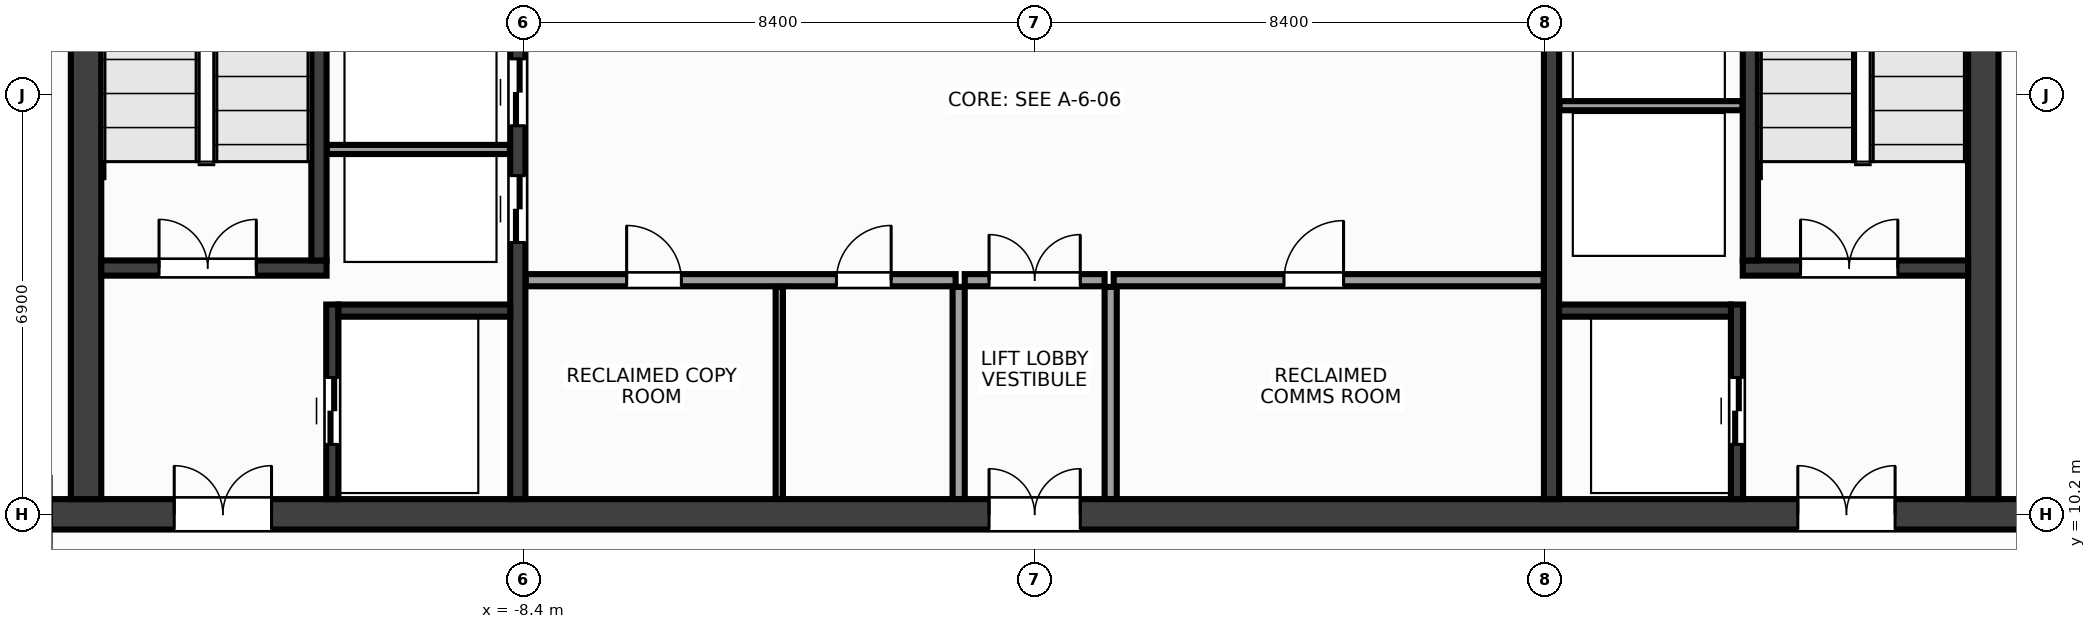
"""IFC4 building model, lengths in metres.
Left out: names, types, materials, properties, quantities, classifications, styles, units other than length and angle.
Written with IfcOpenShell. Run it as: python <this file> out.ifc"""

import sys

from ifc_helpers import new_model, si_unit, direction, frame, frame_2d, origin, place, context, subcontext, project, spatial, rectangle, extrude, source, transform, mapped, element, fill, save


model = new_model("IFC4")
c1 = context("Model", 3, precision=1e-05, world=origin(), true_north=direction((0.0, 1.0)))
c2 = subcontext(c1, "Body", "Model", "MODEL_VIEW")
j1 = project(units=[si_unit("LENGTHUNIT", "METRE"), si_unit("PLANEANGLEUNIT", "RADIAN")], contexts=[c1])
p1 = place(None, origin())
s1 = spatial("IfcSite", under=j1, at=p1, CompositionType="ELEMENT")
p2 = place(p1, origin())
s2 = spatial("IfcBuilding", under=s1, at=p2, CompositionType="ELEMENT")
p3 = place(p2, frame((0.0, 0.0, 272.0)))
s3 = spatial("IfcBuildingStorey", under=s2, at=p3, CompositionType="ELEMENT", Elevation=272.0)
m1 = source(origin(), c2, "Body", "SweptSolid", [
    extrude(rectangle(XDim=32.4, YDim=0.5, at=frame_2d((16.2, 0.0))), origin(), (0.0, 0.0, 1.0), 3.6),
])
p4 = place(p3, frame((-16.2, 10.2, 0.0), z_axis=(0.0, 0.0, 1.0), x_axis=(1.0, 0.0, 0.0)))
e1 = element("IfcWall", 1, at=p4, inside=s3, PredefinedType="SHEAR", context=c2, shape_type="MappedRepresentation", body=[
    mapped(m1, transform((0.0, 0.0, 0.0), x_axis=(1.0, 0.0, 0.0), y_axis=(0.0, 1.0, 0.0), z_axis=(0.0, 0.0, 1.0), scale=1.0)),
])
p5 = place(p4, frame((2.05, 0.0, 0.0)))
e2 = element("IfcOpeningElement", 2, at=p5, cuts=e1, PredefinedType="OPENING", context=c2, shape_type="SweptSolid", body=[
    extrude(rectangle(XDim=1.6, YDim=2.15, at=frame_2d((0.8, 1.075))), frame((0.0, 0.262, 0.0), z_axis=(0.0, -1.0, 0.0), x_axis=(1.0, 0.0, 0.0)), (0.0, 0.0, 1.0), 0.524),
])
p6 = place(p4, frame((28.75, 0.0, 0.0)))
e3 = element("IfcOpeningElement", 3, at=p6, cuts=e1, PredefinedType="OPENING", context=c2, shape_type="SweptSolid", body=[
    extrude(rectangle(XDim=1.6, YDim=2.15, at=frame_2d((0.8, 1.075))), frame((0.0, 0.262, 0.0), z_axis=(0.0, -1.0, 0.0), x_axis=(1.0, 0.0, 0.0)), (0.0, 0.0, 1.0), 0.524),
])
p7 = place(p4, frame((15.45, 0.0, 0.0)))
e4 = element("IfcOpeningElement", 4, at=p7, cuts=e1, PredefinedType="OPENING", context=c2, shape_type="SweptSolid", body=[
    extrude(rectangle(XDim=1.5, YDim=2.2, at=frame_2d((0.75, 1.1))), frame((0.0, 0.262, 0.0), z_axis=(0.0, -1.0, 0.0), x_axis=(1.0, 0.0, 0.0)), (0.0, 0.0, 1.0), 0.524),
])
m2 = source(origin(), c2, "Body", "SweptSolid", [
    extrude(rectangle(XDim=13.1, YDim=0.5, at=frame_2d((6.55, 0.0))), origin(), (0.0, 0.0, 1.0), 3.6),
])
for number, where, z_axis, x_axis in (
    (5, (-15.6, 10.45, 0.0), (0.0, 0.0, 1.0), (0.0, 1.0, 0.0)),
    (6, (15.6, 10.45, 0.0), (0.0, 0.0, 1.0), (0.0, 1.0, 0.0)),
):
    element("IfcWall", number, at=place(p3, frame(where, z_axis=z_axis, x_axis=x_axis)), inside=s3, PredefinedType="SHEAR", context=c2, shape_type="MappedRepresentation", body=[
        mapped(m2, transform((0.0, 0.0, 0.0), x_axis=(1.0, 0.0, 0.0), y_axis=(0.0, 1.0, 0.0), z_axis=(0.0, 0.0, 1.0), scale=1.0)),
    ])
m3 = source(origin(), c2, "Body", "SweptSolid", [
    extrude(rectangle(XDim=13.1, YDim=0.25, at=frame_2d((6.55, 0.0))), origin(), (0.0, 0.0, 1.0), 3.6),
])
p8 = place(p3, frame((-8.5, 10.45, 0.0), z_axis=(0.0, 0.0, 1.0), x_axis=(0.0, 1.0, 0.0)))
e7 = element("IfcWall", 7, at=p8, inside=s3, PredefinedType="SHEAR", context=c2, shape_type="MappedRepresentation", body=[
    mapped(m3, transform((0.0, 0.0, 0.0), x_axis=(1.0, 0.0, 0.0), y_axis=(0.0, 1.0, 0.0), z_axis=(0.0, 0.0, 1.0), scale=1.0)),
])
p9 = place(p8, frame((4.22, 0.0, 0.0)))
e8 = element("IfcOpeningElement", 8, at=p9, cuts=e7, PredefinedType="OPENING", context=c2, shape_type="SweptSolid", body=[
    extrude(rectangle(XDim=1.1, YDim=2.15, at=frame_2d((0.55, 1.075))), frame((0.0, 0.137, 0.0), z_axis=(0.0, -1.0, 0.0), x_axis=(1.0, 0.0, 0.0)), (0.0, 0.0, 1.0), 0.274),
])
p10 = place(p8, frame((6.14, 0.0, 0.0)))
e9 = element("IfcOpeningElement", 9, at=p10, cuts=e7, PredefinedType="OPENING", context=c2, shape_type="SweptSolid", body=[
    extrude(rectangle(XDim=1.1, YDim=2.15, at=frame_2d((0.55, 1.075))), frame((0.0, 0.137, 0.0), z_axis=(0.0, -1.0, 0.0), x_axis=(1.0, 0.0, 0.0)), (0.0, 0.0, 1.0), 0.274),
])
p11 = place(p8, frame((8.06, 0.0, 0.0)))
e10 = element("IfcOpeningElement", 10, at=p11, cuts=e7, PredefinedType="OPENING", context=c2, shape_type="SweptSolid", body=[
    extrude(rectangle(XDim=1.1, YDim=2.15, at=frame_2d((0.55, 1.075))), frame((0.0, 0.137, 0.0), z_axis=(0.0, -1.0, 0.0), x_axis=(1.0, 0.0, 0.0)), (0.0, 0.0, 1.0), 0.274),
])
p12 = place(p3, frame((8.5, 10.45, 0.0), z_axis=(0.0, 0.0, 1.0), x_axis=(0.0, 1.0, 0.0)))
e11 = element("IfcWall", 11, at=p12, inside=s3, PredefinedType="SHEAR", context=c2, shape_type="MappedRepresentation", body=[
    mapped(m3, transform((0.0, 0.0, 0.0), x_axis=(1.0, 0.0, 0.0), y_axis=(0.0, 1.0, 0.0), z_axis=(0.0, 0.0, 1.0), scale=1.0)),
])
p13 = place(p12, frame((10.0, 0.0, 0.0)))
e12 = element("IfcOpeningElement", 12, at=p13, cuts=e11, PredefinedType="OPENING", context=c2, shape_type="SweptSolid", body=[
    extrude(rectangle(XDim=0.95, YDim=2.15, at=frame_2d((0.475, 1.075))), frame((0.0, 0.137, 0.0), z_axis=(0.0, -1.0, 0.0), x_axis=(1.0, 0.0, 0.0)), (0.0, 0.0, 1.0), 0.274),
])
m4 = source(origin(), c2, "Body", "SweptSolid", [
    extrude(rectangle(XDim=3.705, YDim=0.25, at=frame_2d((1.853, 0.0))), origin(), (0.0, 0.0, 1.0), 3.6),
])
p14 = place(p3, frame((-15.35, 14.25, 0.0), z_axis=(0.0, 0.0, 1.0), x_axis=(1.0, 0.0, 0.0)))
e13 = element("IfcWall", 13, at=p14, inside=s3, PredefinedType="SHEAR", context=c2, shape_type="MappedRepresentation", body=[
    mapped(m4, transform((0.0, 0.0, 0.0), x_axis=(1.0, 0.0, 0.0), y_axis=(0.0, 1.0, 0.0), z_axis=(0.0, 0.0, 1.0), scale=1.0)),
])
p15 = place(p14, frame((0.95, 0.0, 0.0)))
e14 = element("IfcOpeningElement", 14, at=p15, cuts=e13, PredefinedType="OPENING", context=c2, shape_type="SweptSolid", body=[
    extrude(rectangle(XDim=1.6, YDim=2.15, at=frame_2d((0.8, 1.075))), frame((0.0, 0.137, 0.0), z_axis=(0.0, -1.0, 0.0), x_axis=(1.0, 0.0, 0.0)), (0.0, 0.0, 1.0), 0.274),
])
m5 = source(origin(), c2, "Body", "SweptSolid", [
    extrude(rectangle(XDim=9.175, YDim=0.25, at=frame_2d((4.587, 0.0))), origin(), (0.0, 0.0, 1.0), 3.6),
])
p16 = place(p3, frame((-11.77, 14.375, 0.0), z_axis=(0.0, 0.0, 1.0), x_axis=(0.0, 1.0, 0.0)))
e15 = element("IfcWall", 15, at=p16, inside=s3, PredefinedType="SHEAR", context=c2, shape_type="MappedRepresentation", body=[
    mapped(m5, transform((0.0, 0.0, 0.0), x_axis=(1.0, 0.0, 0.0), y_axis=(0.0, 1.0, 0.0), z_axis=(0.0, 0.0, 1.0), scale=1.0)),
])
p17 = place(p3, frame((11.645, 14.25, 0.0), z_axis=(0.0, 0.0, 1.0), x_axis=(1.0, 0.0, 0.0)))
e16 = element("IfcWall", 16, at=p17, inside=s3, PredefinedType="SHEAR", context=c2, shape_type="MappedRepresentation", body=[
    mapped(m4, transform((0.0, 0.0, 0.0), x_axis=(1.0, 0.0, 0.0), y_axis=(0.0, 1.0, 0.0), z_axis=(0.0, 0.0, 1.0), scale=1.0)),
])
p18 = place(p17, frame((0.95, 0.0, 0.0)))
e17 = element("IfcOpeningElement", 17, at=p18, cuts=e16, PredefinedType="OPENING", context=c2, shape_type="SweptSolid", body=[
    extrude(rectangle(XDim=1.6, YDim=2.15, at=frame_2d((0.8, 1.075))), frame((0.0, 0.137, 0.0), z_axis=(0.0, -1.0, 0.0), x_axis=(1.0, 0.0, 0.0)), (0.0, 0.0, 1.0), 0.274),
])
p19 = place(p3, frame((11.77, 14.375, 0.0), z_axis=(0.0, 0.0, 1.0), x_axis=(0.0, 1.0, 0.0)))
e18 = element("IfcWall", 18, at=p19, inside=s3, PredefinedType="SHEAR", context=c2, shape_type="MappedRepresentation", body=[
    mapped(m5, transform((0.0, 0.0, 0.0), x_axis=(1.0, 0.0, 0.0), y_axis=(0.0, 1.0, 0.0), z_axis=(0.0, 0.0, 1.0), scale=1.0)),
])
m6 = source(origin(), c2, "Body", "SweptSolid", [
    extrude(rectangle(XDim=3.2, YDim=0.2, at=frame_2d((1.6, 0.0))), origin(), (0.0, 0.0, 1.0), 3.6),
])
p20 = place(p3, frame((-11.55, 10.45, 0.0), z_axis=(0.0, 0.0, 1.0), x_axis=(0.0, 1.0, 0.0)))
e19 = element("IfcWall", 19, at=p20, inside=s3, PredefinedType="SHEAR", context=c2, shape_type="MappedRepresentation", body=[
    mapped(m6, transform((0.0, 0.0, 0.0), x_axis=(1.0, 0.0, 0.0), y_axis=(0.0, 1.0, 0.0), z_axis=(0.0, 0.0, 1.0), scale=1.0)),
])
p21 = place(p20, frame((0.9, 0.0, 0.0)))
e20 = element("IfcOpeningElement", 20, at=p21, cuts=e19, PredefinedType="OPENING", context=c2, shape_type="SweptSolid", body=[
    extrude(rectangle(XDim=1.1, YDim=2.15, at=frame_2d((0.55, 1.075))), frame((0.0, 0.112, 0.0), z_axis=(0.0, -1.0, 0.0), x_axis=(1.0, 0.0, 0.0)), (0.0, 0.0, 1.0), 0.224),
])
m7 = source(origin(), c2, "Body", "SweptSolid", [
    extrude(rectangle(XDim=2.825, YDim=0.2, at=frame_2d((1.413, 0.0))), origin(), (0.0, 0.0, 1.0), 3.6),
])
p22 = place(p3, frame((-11.45, 13.55, 0.0), z_axis=(0.0, 0.0, 1.0), x_axis=(1.0, 0.0, 0.0)))
e21 = element("IfcWall", 21, at=p22, inside=s3, PredefinedType="SHEAR", context=c2, shape_type="MappedRepresentation", body=[
    mapped(m7, transform((0.0, 0.0, 0.0), x_axis=(1.0, 0.0, 0.0), y_axis=(0.0, 1.0, 0.0), z_axis=(0.0, 0.0, 1.0), scale=1.0)),
])
p23 = place(p3, frame((11.55, 10.45, 0.0), z_axis=(0.0, 0.0, 1.0), x_axis=(0.0, 1.0, 0.0)))
e22 = element("IfcWall", 22, at=p23, inside=s3, PredefinedType="SHEAR", context=c2, shape_type="MappedRepresentation", body=[
    mapped(m6, transform((0.0, 0.0, 0.0), x_axis=(1.0, 0.0, 0.0), y_axis=(0.0, 1.0, 0.0), z_axis=(0.0, 0.0, 1.0), scale=1.0)),
])
p24 = place(p23, frame((0.9, 0.0, 0.0)))
e23 = element("IfcOpeningElement", 23, at=p24, cuts=e22, PredefinedType="OPENING", context=c2, shape_type="SweptSolid", body=[
    extrude(rectangle(XDim=1.1, YDim=2.15, at=frame_2d((0.55, 1.075))), frame((0.0, 0.112, 0.0), z_axis=(0.0, -1.0, 0.0), x_axis=(1.0, 0.0, 0.0)), (0.0, 0.0, 1.0), 0.224),
])
p25 = place(p3, frame((8.625, 13.55, 0.0), z_axis=(0.0, 0.0, 1.0), x_axis=(1.0, 0.0, 0.0)))
e24 = element("IfcWall", 24, at=p25, inside=s3, PredefinedType="SHEAR", context=c2, shape_type="MappedRepresentation", body=[
    mapped(m7, transform((0.0, 0.0, 0.0), x_axis=(1.0, 0.0, 0.0), y_axis=(0.0, 1.0, 0.0), z_axis=(0.0, 0.0, 1.0), scale=1.0)),
])
m8 = source(origin(), c2, "Body", "SweptSolid", [
    extrude(rectangle(XDim=3.01, YDim=0.15, at=frame_2d((1.505, 0.0))), origin(), (0.0, 0.0, 1.0), 3.37),
])
for number, where, z_axis, x_axis in (
    (25, (-11.64, 16.2, 0.0), (0.0, 0.0, 1.0), (1.0, 0.0, 0.0)),
    (26, (8.63, 16.92, 0.0), (0.0, 0.0, 1.0), (1.0, 0.0, 0.0)),
):
    element("IfcWall", number, at=place(p3, frame(where, z_axis=z_axis, x_axis=x_axis)), inside=s3, PredefinedType="PARTITIONING", context=c2, shape_type="MappedRepresentation", body=[
        mapped(m8, transform((0.0, 0.0, 0.0), x_axis=(1.0, 0.0, 0.0), y_axis=(0.0, 1.0, 0.0), z_axis=(0.0, 0.0, 1.0), scale=1.0)),
    ])
m9 = source(origin(), c2, "Body", "SweptSolid", [
    extrude(rectangle(XDim=7.07, YDim=0.2, at=frame_2d((3.535, 0.0))), origin(), (0.0, 0.0, 1.0), 3.37),
])
p26 = place(p3, frame((-8.37, 14.05, 0.0), z_axis=(0.0, 0.0, 1.0), x_axis=(1.0, 0.0, 0.0)))
e27 = element("IfcWall", 27, at=p26, inside=s3, PredefinedType="PARTITIONING", context=c2, shape_type="MappedRepresentation", body=[
    mapped(m9, transform((0.0, 0.0, 0.0), x_axis=(1.0, 0.0, 0.0), y_axis=(0.0, 1.0, 0.0), z_axis=(0.0, 0.0, 1.0), scale=1.0)),
])
p27 = place(p26, frame((1.66, 0.0, 0.0)))
e28 = element("IfcOpeningElement", 28, at=p27, cuts=e27, PredefinedType="OPENING", context=c2, shape_type="SweptSolid", body=[
    extrude(rectangle(XDim=0.9, YDim=2.15, at=frame_2d((0.45, 1.075))), frame((0.0, 0.112, 0.0), z_axis=(0.0, -1.0, 0.0), x_axis=(1.0, 0.0, 0.0)), (0.0, 0.0, 1.0), 0.224),
])
p28 = place(p26, frame((5.11, 0.0, 0.0)))
e29 = element("IfcOpeningElement", 29, at=p28, cuts=e27, PredefinedType="OPENING", context=c2, shape_type="SweptSolid", body=[
    extrude(rectangle(XDim=0.9, YDim=2.15, at=frame_2d((0.45, 1.075))), frame((0.0, 0.112, 0.0), z_axis=(0.0, -1.0, 0.0), x_axis=(1.0, 0.0, 0.0)), (0.0, 0.0, 1.0), 0.224),
])
p29 = place(p3, frame((1.3, 14.05, 0.0), z_axis=(0.0, 0.0, 1.0), x_axis=(1.0, 0.0, 0.0)))
e30 = element("IfcWall", 30, at=p29, inside=s3, PredefinedType="PARTITIONING", context=c2, shape_type="MappedRepresentation", body=[
    mapped(m9, transform((0.0, 0.0, 0.0), x_axis=(1.0, 0.0, 0.0), y_axis=(0.0, 1.0, 0.0), z_axis=(0.0, 0.0, 1.0), scale=1.0)),
])
p30 = place(p29, frame((2.8, 0.0, 0.0)))
e31 = element("IfcOpeningElement", 31, at=p30, cuts=e30, PredefinedType="OPENING", context=c2, shape_type="SweptSolid", body=[
    extrude(rectangle(XDim=0.98, YDim=2.15, at=frame_2d((0.49, 1.075))), frame((0.0, 0.112, 0.0), z_axis=(0.0, -1.0, 0.0), x_axis=(1.0, 0.0, 0.0)), (0.0, 0.0, 1.0), 0.224),
])
m10 = source(origin(), c2, "Body", "SweptSolid", [
    extrude(rectangle(XDim=3.49, YDim=0.2, at=frame_2d((1.745, 0.0))), origin(), (0.0, 0.0, 1.0), 3.37),
])
for number, where, z_axis, x_axis in (
    (32, (-1.25, 10.45, 0.0), (0.0, 0.0, 1.0), (0.0, 1.0, 0.0)),
    (33, (1.25, 10.45, 0.0), (0.0, 0.0, 1.0), (0.0, 1.0, 0.0)),
):
    element("IfcWall", number, at=place(p3, frame(where, z_axis=z_axis, x_axis=x_axis)), inside=s3, PredefinedType="PARTITIONING", context=c2, shape_type="MappedRepresentation", body=[
        mapped(m10, transform((0.0, 0.0, 0.0), x_axis=(1.0, 0.0, 0.0), y_axis=(0.0, 1.0, 0.0), z_axis=(0.0, 0.0, 1.0), scale=1.0)),
    ])
m11 = source(origin(), c2, "Body", "SweptSolid", [
    extrude(rectangle(XDim=2.3, YDim=0.2, at=frame_2d((1.15, 0.0))), origin(), (0.0, 0.0, 1.0), 3.37),
])
p31 = place(p3, frame((-1.15, 14.05, 0.0), z_axis=(0.0, 0.0, 1.0), x_axis=(1.0, 0.0, 0.0)))
e34 = element("IfcWall", 34, at=p31, inside=s3, PredefinedType="PARTITIONING", context=c2, shape_type="MappedRepresentation", body=[
    mapped(m11, transform((0.0, 0.0, 0.0), x_axis=(1.0, 0.0, 0.0), y_axis=(0.0, 1.0, 0.0), z_axis=(0.0, 0.0, 1.0), scale=1.0)),
])
p32 = place(p31, frame((0.4, 0.0, 0.0)))
e35 = element("IfcOpeningElement", 35, at=p32, cuts=e34, PredefinedType="OPENING", context=c2, shape_type="SweptSolid", body=[
    extrude(rectangle(XDim=1.5, YDim=2.2, at=frame_2d((0.75, 1.1))), frame((0.0, 0.112, 0.0), z_axis=(0.0, -1.0, 0.0), x_axis=(1.0, 0.0, 0.0)), (0.0, 0.0, 1.0), 0.224),
])
m12 = source(origin(), c2, "Body", "SweptSolid", [
    extrude(rectangle(XDim=3.49, YDim=0.12, at=frame_2d((1.745, 0.0))), origin(), (0.0, 0.0, 1.0), 3.37),
])
p33 = place(p3, frame((-4.2, 10.45, 0.0), z_axis=(0.0, 0.0, 1.0), x_axis=(0.0, 1.0, 0.0)))
e36 = element("IfcWall", 36, at=p33, inside=s3, PredefinedType="PARTITIONING", context=c2, shape_type="MappedRepresentation", body=[
    mapped(m12, transform((0.0, 0.0, 0.0), x_axis=(1.0, 0.0, 0.0), y_axis=(0.0, 1.0, 0.0), z_axis=(0.0, 0.0, 1.0), scale=1.0)),
])
m13 = source(origin(), c2, "Body", "SweptSolid", [
    extrude(rectangle(XDim=1.6, YDim=2.15, at=frame_2d((0.8, 1.075))), frame((0.0, 0.025, 0.0), z_axis=(0.0, -1.0, 0.0), x_axis=(1.0, 0.0, 0.0)), (0.0, 0.0, 1.0), 0.05),
])
p34 = place(p15, origin())
e37 = element("IfcDoor", 37, at=p34, inside=s3, OperationType="DOUBLE_DOOR_SINGLE_SWING", PredefinedType="DOOR", context=c2, shape_type="MappedRepresentation", body=[
    mapped(m13, transform((0.0, 0.0, 0.0), x_axis=(1.0, 0.0, 0.0), y_axis=(0.0, 1.0, 0.0), z_axis=(0.0, 0.0, 1.0), scale=1.0)),
])
fill(e14, e37)
p35 = place(p18, origin())
e38 = element("IfcDoor", 38, at=p35, inside=s3, OperationType="DOUBLE_DOOR_SINGLE_SWING", PredefinedType="DOOR", context=c2, shape_type="MappedRepresentation", body=[
    mapped(m13, transform((0.0, 0.0, 0.0), x_axis=(1.0, 0.0, 0.0), y_axis=(0.0, 1.0, 0.0), z_axis=(0.0, 0.0, 1.0), scale=1.0)),
])
fill(e17, e38)
p36 = place(p5, origin())
e39 = element("IfcDoor", 39, at=p36, inside=s3, OperationType="DOUBLE_DOOR_SINGLE_SWING", PredefinedType="DOOR", context=c2, shape_type="MappedRepresentation", body=[
    mapped(m13, transform((0.0, 0.0, 0.0), x_axis=(1.0, 0.0, 0.0), y_axis=(0.0, 1.0, 0.0), z_axis=(0.0, 0.0, 1.0), scale=1.0)),
])
fill(e2, e39)
p37 = place(p6, origin())
e40 = element("IfcDoor", 40, at=p37, inside=s3, OperationType="DOUBLE_DOOR_SINGLE_SWING", PredefinedType="DOOR", context=c2, shape_type="MappedRepresentation", body=[
    mapped(m13, transform((0.0, 0.0, 0.0), x_axis=(1.0, 0.0, 0.0), y_axis=(0.0, 1.0, 0.0), z_axis=(0.0, 0.0, 1.0), scale=1.0)),
])
fill(e3, e40)
m14 = source(origin(), c2, "Body", "SweptSolid", [
    extrude(rectangle(XDim=1.1, YDim=2.15, at=frame_2d((0.55, 1.075))), frame((0.0, 0.025, 0.0), z_axis=(0.0, -1.0, 0.0), x_axis=(1.0, 0.0, 0.0)), (0.0, 0.0, 1.0), 0.05),
])
p38 = place(p21, origin())
e41 = element("IfcDoor", 41, at=p38, inside=s3, OperationType="DOUBLE_DOOR_SLIDING", PredefinedType="DOOR", context=c2, shape_type="MappedRepresentation", body=[
    mapped(m14, transform((0.0, 0.0, 0.0), x_axis=(1.0, 0.0, 0.0), y_axis=(0.0, 1.0, 0.0), z_axis=(0.0, 0.0, 1.0), scale=1.0)),
])
fill(e20, e41)
p39 = place(p24, origin())
e42 = element("IfcDoor", 42, at=p39, inside=s3, OperationType="DOUBLE_DOOR_SLIDING", PredefinedType="DOOR", context=c2, shape_type="MappedRepresentation", body=[
    mapped(m14, transform((0.0, 0.0, 0.0), x_axis=(1.0, 0.0, 0.0), y_axis=(0.0, 1.0, 0.0), z_axis=(0.0, 0.0, 1.0), scale=1.0)),
])
fill(e23, e42)
p40 = place(p9, origin())
e43 = element("IfcDoor", 43, at=p40, inside=s3, OperationType="DOUBLE_DOOR_SLIDING", PredefinedType="DOOR", context=c2, shape_type="MappedRepresentation", body=[
    mapped(m14, transform((0.0, 0.0, 0.0), x_axis=(1.0, 0.0, 0.0), y_axis=(0.0, 1.0, 0.0), z_axis=(0.0, 0.0, 1.0), scale=1.0)),
])
fill(e8, e43)
p41 = place(p10, origin())
e44 = element("IfcDoor", 44, at=p41, inside=s3, OperationType="DOUBLE_DOOR_SLIDING", PredefinedType="DOOR", context=c2, shape_type="MappedRepresentation", body=[
    mapped(m14, transform((0.0, 0.0, 0.0), x_axis=(1.0, 0.0, 0.0), y_axis=(0.0, 1.0, 0.0), z_axis=(0.0, 0.0, 1.0), scale=1.0)),
])
fill(e9, e44)
m15 = source(origin(), c2, "Body", "SweptSolid", [
    extrude(rectangle(XDim=0.9, YDim=2.15, at=frame_2d((0.45, 1.075))), frame((0.0, 0.025, 0.0), z_axis=(0.0, -1.0, 0.0), x_axis=(1.0, 0.0, 0.0)), (0.0, 0.0, 1.0), 0.05),
])
p42 = place(p27, origin())
e45 = element("IfcDoor", 45, at=p42, inside=s3, OperationType="SINGLE_SWING_LEFT", PredefinedType="DOOR", context=c2, shape_type="MappedRepresentation", body=[
    mapped(m15, transform((0.0, 0.0, 0.0), x_axis=(1.0, 0.0, 0.0), y_axis=(0.0, 1.0, 0.0), z_axis=(0.0, 0.0, 1.0), scale=1.0)),
])
fill(e28, e45)
p43 = place(p28, origin())
e46 = element("IfcDoor", 46, at=p43, inside=s3, OperationType="SINGLE_SWING_RIGHT", PredefinedType="DOOR", context=c2, shape_type="MappedRepresentation", body=[
    mapped(m15, transform((0.0, 0.0, 0.0), x_axis=(1.0, 0.0, 0.0), y_axis=(0.0, 1.0, 0.0), z_axis=(0.0, 0.0, 1.0), scale=1.0)),
])
fill(e29, e46)
m16 = source(origin(), c2, "Body", "SweptSolid", [
    extrude(rectangle(XDim=0.98, YDim=2.15, at=frame_2d((0.49, 1.075))), frame((0.0, 0.025, 0.0), z_axis=(0.0, -1.0, 0.0), x_axis=(1.0, 0.0, 0.0)), (0.0, 0.0, 1.0), 0.05),
])
p44 = place(p30, origin())
e47 = element("IfcDoor", 47, at=p44, inside=s3, OperationType="SINGLE_SWING_RIGHT", PredefinedType="DOOR", context=c2, shape_type="MappedRepresentation", body=[
    mapped(m16, transform((0.0, 0.0, 0.0), x_axis=(1.0, 0.0, 0.0), y_axis=(0.0, 1.0, 0.0), z_axis=(0.0, 0.0, 1.0), scale=1.0)),
])
fill(e31, e47)
m17 = source(origin(), c2, "Body", "SweptSolid", [
    extrude(rectangle(XDim=1.5, YDim=2.2, at=frame_2d((0.75, 1.1))), frame((0.0, 0.025, 0.0), z_axis=(0.0, -1.0, 0.0), x_axis=(1.0, 0.0, 0.0)), (0.0, 0.0, 1.0), 0.05),
])
p45 = place(p32, origin())
e48 = element("IfcDoor", 48, at=p45, inside=s3, OperationType="DOUBLE_DOOR_SINGLE_SWING", PredefinedType="DOOR", context=c2, shape_type="MappedRepresentation", body=[
    mapped(m17, transform((0.0, 0.0, 0.0), x_axis=(1.0, 0.0, 0.0), y_axis=(0.0, 1.0, 0.0), z_axis=(0.0, 0.0, 1.0), scale=1.0)),
])
fill(e35, e48)
p46 = place(p7, origin())
e49 = element("IfcDoor", 49, at=p46, inside=s3, OperationType="DOUBLE_DOOR_SINGLE_SWING", PredefinedType="DOOR", context=c2, shape_type="MappedRepresentation", body=[
    mapped(m17, transform((0.0, 0.0, 0.0), x_axis=(1.0, 0.0, 0.0), y_axis=(0.0, 1.0, 0.0), z_axis=(0.0, 0.0, 1.0), scale=1.0)),
])
fill(e4, e49)
save(model, sys.argv[1])
